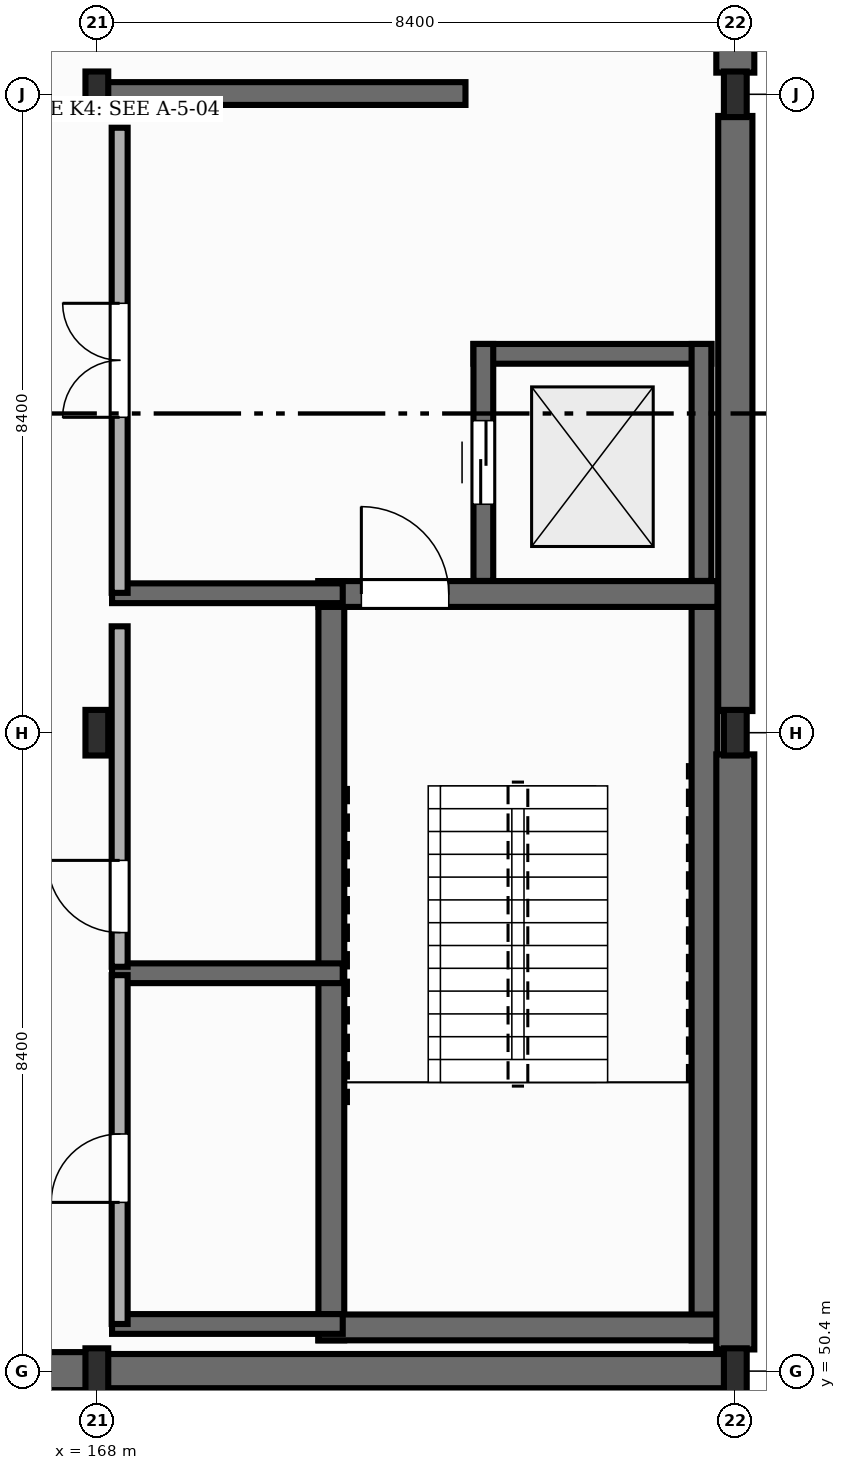
"""IFC4 building model, lengths in metres.
Left out: names, types, materials, properties, quantities, classifications, styles, units other than length and angle.
Written with IfcOpenShell. Run it as: python <this file> out.ifc"""

import sys

from ifc_helpers import new_model, si_unit, direction, frame, frame_2d, origin, origin_2d, place, context, subcontext, project, spatial, rectangle, i_section, extrude, element, fill, save


model = new_model("IFC4")
c1 = context("Model", 3, precision=1e-05, world=origin(), true_north=direction((0.0, 1.0)))
c2 = subcontext(c1, "Body", "Model", "MODEL_VIEW")
j1 = project(units=[si_unit("LENGTHUNIT", "METRE"), si_unit("PLANEANGLEUNIT", "RADIAN")], contexts=[c1])
p1 = place(None, origin())
s1 = spatial("IfcSite", under=j1, at=p1, CompositionType="ELEMENT")
p2 = place(p1, origin())
s2 = spatial("IfcBuilding", under=s1, at=p2, CompositionType="ELEMENT")
p3 = place(p2, frame((0.0, 0.0, -4.5)))
s3 = spatial("IfcBuildingStorey", under=s2, at=p3, CompositionType="ELEMENT", Elevation=-4.5)
for number, where, z_axis, x_axis in (
    (1, (168.0, 50.4, 0.0), (0.0, 0.0, 1.0), (1.0, 0.0, 0.0)),
    (2, (168.0, 58.8, 0.0), (0.0, 0.0, 1.0), (1.0, 0.0, 0.0)),
    (3, (168.0, 67.2, 0.0), (0.0, 0.0, 1.0), (1.0, 0.0, 0.0)),
    (4, (176.4, 50.4, 0.0), (0.0, 0.0, 1.0), (1.0, 0.0, 0.0)),
    (5, (176.4, 58.8, 0.0), (0.0, 0.0, 1.0), (1.0, 0.0, 0.0)),
    (6, (176.4, 67.2, 0.0), (0.0, 0.0, 1.0), (1.0, 0.0, 0.0)),
):
    element("IfcColumn", number, at=place(p3, frame(where, z_axis=z_axis, x_axis=x_axis)), inside=s3, PredefinedType="COLUMN", context=c2, shape_type="SweptSolid", body=[
        extrude(i_section(OverallWidth=0.3, OverallDepth=0.6, WebThickness=0.015, FlangeThickness=0.03, FilletRadius=0.027, at=origin_2d()), origin(), (0.0, 0.0, 1.0), 4.5),
    ])
p4 = place(p3, frame((159.608, 50.4, 0.0), z_axis=(0.0, 0.0, 1.0), x_axis=(1.0, 0.0, 0.0)))
e7 = element("IfcWall", 7, at=p4, inside=s3, PredefinedType="USERDEFINED", context=c2, shape_type="SweptSolid", body=[
    extrude(rectangle(XDim=8.384, YDim=0.5, at=frame_2d((4.192, 0.0))), origin(), (0.0, 0.0, 1.0), 4.25),
])
p5 = place(p3, frame((168.008, 50.4, 0.0), z_axis=(0.0, 0.0, 1.0), x_axis=(1.0, 0.0, 0.0)))
e8 = element("IfcWall", 8, at=p5, inside=s3, PredefinedType="USERDEFINED", context=c2, shape_type="SweptSolid", body=[
    extrude(rectangle(XDim=8.384, YDim=0.45, at=frame_2d((4.192, 0.0))), origin(), (0.0, 0.0, 1.0), 4.25),
])
p6 = place(p3, frame((176.4, 59.085, 0.0), z_axis=(0.0, 0.0, 1.0), x_axis=(0.0, 1.0, 0.0)))
e9 = element("IfcWall", 9, at=p6, inside=s3, PredefinedType="USERDEFINED", context=c2, shape_type="SweptSolid", body=[
    extrude(rectangle(XDim=7.83, YDim=0.45, at=frame_2d((3.915, 0.0))), origin(), (0.0, 0.0, 1.0), 4.25),
])
p7 = place(p3, frame((176.4, 67.485, 0.0), z_axis=(0.0, 0.0, 1.0), x_axis=(0.0, 1.0, 0.0)))
e10 = element("IfcWall", 10, at=p7, inside=s3, PredefinedType="USERDEFINED", context=c2, shape_type="SweptSolid", body=[
    extrude(rectangle(XDim=7.83, YDim=0.5, at=frame_2d((3.915, 0.0))), origin(), (0.0, 0.0, 1.0), 4.25),
])
for number, where, z_axis, x_axis in (
    (11, (171.085, 50.805, 0.0), (0.0, 0.0, 1.0), (0.0, 1.0, 0.0)),
    (12, (175.995, 50.805, 0.0), (0.0, 0.0, 1.0), (0.0, 1.0, 0.0)),
):
    element("IfcWall", number, at=place(p3, frame(where, z_axis=z_axis, x_axis=x_axis)), inside=s3, PredefinedType="SHEAR", context=c2, shape_type="SweptSolid", body=[
        extrude(rectangle(XDim=9.99, YDim=0.34, at=frame_2d((4.995, 0.0))), origin(), (0.0, 0.0, 1.0), 4.25),
    ])
p8 = place(p3, frame((170.915, 50.975, 0.0), z_axis=(0.0, 0.0, 1.0), x_axis=(1.0, 0.0, 0.0)))
e13 = element("IfcWall", 13, at=p8, inside=s3, PredefinedType="SHEAR", context=c2, shape_type="SweptSolid", body=[
    extrude(rectangle(XDim=5.25, YDim=0.34, at=frame_2d((2.625, 0.0))), origin(), (0.0, 0.0, 1.0), 4.25),
])
p9 = place(p3, frame((170.915, 60.625, 0.0), z_axis=(0.0, 0.0, 1.0), x_axis=(1.0, 0.0, 0.0)))
e14 = element("IfcWall", 14, at=p9, inside=s3, PredefinedType="SHEAR", context=c2, shape_type="SweptSolid", body=[
    extrude(rectangle(XDim=5.25, YDim=0.34, at=frame_2d((2.625, 0.0))), origin(), (0.0, 0.0, 1.0), 4.25),
])
p10 = place(p9, frame((0.565, 0.0, 0.0)))
e15 = element("IfcOpeningElement", 15, at=p10, cuts=e14, PredefinedType="OPENING", context=c2, shape_type="SweptSolid", body=[
    extrude(rectangle(XDim=1.15, YDim=2.15, at=frame_2d((0.575, 1.075))), frame((0.0, 0.18, 0.0), z_axis=(0.0, -1.0, 0.0), x_axis=(1.0, 0.0, 0.0)), (0.0, 0.0, 1.0), 0.36),
])
p11 = place(p3, frame((172.955, 63.785, 0.0), z_axis=(0.0, 0.0, 1.0), x_axis=(1.0, 0.0, 0.0)))
e16 = element("IfcWall", 16, at=p11, inside=s3, PredefinedType="SHEAR", context=c2, shape_type="SweptSolid", body=[
    extrude(rectangle(XDim=3.13, YDim=0.26, at=frame_2d((1.565, 0.0))), origin(), (0.0, 0.0, 1.0), 4.25),
])
p12 = place(p3, frame((175.955, 60.797, 0.0), z_axis=(0.0, 0.0, 1.0), x_axis=(0.0, 1.0, 0.0)))
e17 = element("IfcWall", 17, at=p12, inside=s3, PredefinedType="SHEAR", context=c2, shape_type="SweptSolid", body=[
    extrude(rectangle(XDim=3.118, YDim=0.26, at=frame_2d((1.559, 0.0))), origin(), (0.0, 0.0, 1.0), 4.25),
])
p13 = place(p3, frame((173.085, 60.797, 0.0), z_axis=(0.0, 0.0, 1.0), x_axis=(0.0, 1.0, 0.0)))
e18 = element("IfcWall", 18, at=p13, inside=s3, PredefinedType="SHEAR", context=c2, shape_type="SweptSolid", body=[
    extrude(rectangle(XDim=3.118, YDim=0.26, at=frame_2d((1.559, 0.0))), origin(), (0.0, 0.0, 1.0), 4.25),
])
p14 = place(p13, frame((1.009, 0.0, 0.0)))
e19 = element("IfcOpeningElement", 19, at=p14, cuts=e18, PredefinedType="OPENING", context=c2, shape_type="SweptSolid", body=[
    extrude(rectangle(XDim=1.1, YDim=2.15, at=frame_2d((0.55, 1.075))), frame((0.0, 0.14, 0.0), z_axis=(0.0, -1.0, 0.0), x_axis=(1.0, 0.0, 0.0)), (0.0, 0.0, 1.0), 0.28),
])
for number, where, z_axis, x_axis in (
    (20, (168.2, 51.02, 0.0), (0.0, 0.0, 1.0), (1.0, 0.0, 0.0)),
    (21, (168.2, 55.635, 0.0), (0.0, 0.0, 1.0), (1.0, 0.0, 0.0)),
    (22, (168.2, 60.635, 0.0), (0.0, 0.0, 1.0), (1.0, 0.0, 0.0)),
):
    element("IfcWall", number, at=place(p3, frame(where, z_axis=z_axis, x_axis=x_axis)), inside=s3, PredefinedType="SHEAR", context=c2, shape_type="SweptSolid", body=[
        extrude(rectangle(XDim=3.035, YDim=0.26, at=frame_2d((1.518, 0.0))), origin(), (0.0, 0.0, 1.0), 4.25),
    ])
p15 = place(p3, frame((167.98, 67.21, 0.0), z_axis=(0.0, 0.0, 1.0), x_axis=(1.0, 0.0, 0.0)))
e23 = element("IfcWall", 23, at=p15, inside=s3, PredefinedType="SHEAR", context=c2, shape_type="SweptSolid", body=[
    extrude(rectangle(XDim=4.87, YDim=0.3, at=frame_2d((2.435, 0.0))), origin(), (0.0, 0.0, 1.0), 4.25),
])
p16 = place(p3, frame((168.3, 51.02, 0.0), z_axis=(0.0, 0.0, 1.0), x_axis=(0.0, 1.0, 0.0)))
e24 = element("IfcWall", 24, at=p16, inside=s3, PredefinedType="STANDARD", context=c2, shape_type="SweptSolid", body=[
    extrude(rectangle(XDim=4.59, YDim=0.21, at=frame_2d((2.295, 0.0))), origin(), (0.0, 0.0, 1.0), 3.832),
])
p17 = place(p16, frame((1.6, 0.0, 0.0)))
e25 = element("IfcOpeningElement", 25, at=p17, cuts=e24, PredefinedType="OPENING", context=c2, shape_type="SweptSolid", body=[
    extrude(rectangle(XDim=0.9, YDim=2.1, at=frame_2d((0.45, 1.05))), frame((0.0, 0.115, 0.0), z_axis=(0.0, -1.0, 0.0), x_axis=(1.0, 0.0, 0.0)), (0.0, 0.0, 1.0), 0.23),
])
p18 = place(p3, frame((168.3, 55.72, 0.0), z_axis=(0.0, 0.0, 1.0), x_axis=(0.0, 1.0, 0.0)))
e26 = element("IfcWall", 26, at=p18, inside=s3, PredefinedType="STANDARD", context=c2, shape_type="SweptSolid", body=[
    extrude(rectangle(XDim=4.48, YDim=0.21, at=frame_2d((2.24, 0.0))), origin(), (0.0, 0.0, 1.0), 3.832),
])
p19 = place(p18, frame((0.45, 0.0, 0.0)))
e27 = element("IfcOpeningElement", 27, at=p19, cuts=e26, PredefinedType="OPENING", context=c2, shape_type="SweptSolid", body=[
    extrude(rectangle(XDim=0.95, YDim=2.15, at=frame_2d((0.475, 1.075))), frame((0.0, 0.115, 0.0), z_axis=(0.0, -1.0, 0.0), x_axis=(1.0, 0.0, 0.0)), (0.0, 0.0, 1.0), 0.23),
])
p20 = place(p3, frame((168.3, 60.64, 0.0), z_axis=(0.0, 0.0, 1.0), x_axis=(0.0, 1.0, 0.0)))
e28 = element("IfcWall", 28, at=p20, inside=s3, PredefinedType="STANDARD", context=c2, shape_type="SweptSolid", body=[
    extrude(rectangle(XDim=6.12, YDim=0.21, at=frame_2d((3.06, 0.0))), origin(), (0.0, 0.0, 1.0), 3.882),
])
p21 = place(p20, frame((2.31, 0.0, 0.0)))
e29 = element("IfcOpeningElement", 29, at=p21, cuts=e28, PredefinedType="OPENING", context=c2, shape_type="SweptSolid", body=[
    extrude(rectangle(XDim=1.5, YDim=2.2, at=frame_2d((0.75, 1.1))), frame((0.0, 0.115, 0.0), z_axis=(0.0, -1.0, 0.0), x_axis=(1.0, 0.0, 0.0)), (0.0, 0.0, 1.0), 0.23),
])
p22 = place(p3, frame((176.4, 50.685, 0.0), z_axis=(0.0, 0.0, 1.0), x_axis=(0.0, 1.0, 0.0)))
e30 = element("IfcWall", 30, at=p22, inside=s3, PredefinedType="USERDEFINED", context=c2, shape_type="SweptSolid", body=[
    extrude(rectangle(XDim=7.83, YDim=0.5, at=frame_2d((3.915, 0.0))), origin(), (0.0, 0.0, 1.0), 4.25),
])
p23 = place(p10, origin())
e31 = element("IfcDoor", 31, at=p23, inside=s3, OperationType="SINGLE_SWING_LEFT", PredefinedType="DOOR", context=c2, shape_type="SweptSolid", body=[
    extrude(rectangle(XDim=1.15, YDim=2.15, at=frame_2d((0.575, 1.075))), frame((0.0, 0.025, 0.0), z_axis=(0.0, -1.0, 0.0), x_axis=(1.0, 0.0, 0.0)), (0.0, 0.0, 1.0), 0.05),
])
fill(e15, e31)
p24 = place(p14, origin())
e32 = element("IfcDoor", 32, at=p24, inside=s3, OperationType="DOUBLE_DOOR_SLIDING", PredefinedType="DOOR", context=c2, shape_type="SweptSolid", body=[
    extrude(rectangle(XDim=1.1, YDim=2.15, at=frame_2d((0.55, 1.075))), frame((0.0, 0.025, 0.0), z_axis=(0.0, -1.0, 0.0), x_axis=(1.0, 0.0, 0.0)), (0.0, 0.0, 1.0), 0.05),
])
fill(e19, e32)
p25 = place(p17, origin())
e33 = element("IfcDoor", 33, at=p25, inside=s3, OperationType="SINGLE_SWING_LEFT", PredefinedType="DOOR", context=c2, shape_type="SweptSolid", body=[
    extrude(rectangle(XDim=0.9, YDim=2.1, at=frame_2d((0.45, 1.05))), frame((0.0, 0.025, 0.0), z_axis=(0.0, -1.0, 0.0), x_axis=(1.0, 0.0, 0.0)), (0.0, 0.0, 1.0), 0.05),
])
fill(e25, e33)
p26 = place(p19, origin())
e34 = element("IfcDoor", 34, at=p26, inside=s3, OperationType="SINGLE_SWING_RIGHT", PredefinedType="DOOR", context=c2, shape_type="SweptSolid", body=[
    extrude(rectangle(XDim=0.95, YDim=2.15, at=frame_2d((0.475, 1.075))), frame((0.0, 0.025, 0.0), z_axis=(0.0, -1.0, 0.0), x_axis=(1.0, 0.0, 0.0)), (0.0, 0.0, 1.0), 0.05),
])
fill(e27, e34)
p27 = place(p21, origin())
e35 = element("IfcDoor", 35, at=p27, inside=s3, OperationType="DOUBLE_DOOR_SINGLE_SWING", PredefinedType="DOOR", context=c2, shape_type="SweptSolid", body=[
    extrude(rectangle(XDim=1.5, YDim=2.2, at=frame_2d((0.75, 1.1))), frame((0.0, 0.025, 0.0), z_axis=(0.0, -1.0, 0.0), x_axis=(1.0, 0.0, 0.0)), (0.0, 0.0, 1.0), 0.05),
])
fill(e29, e35)
save(model, sys.argv[1])
